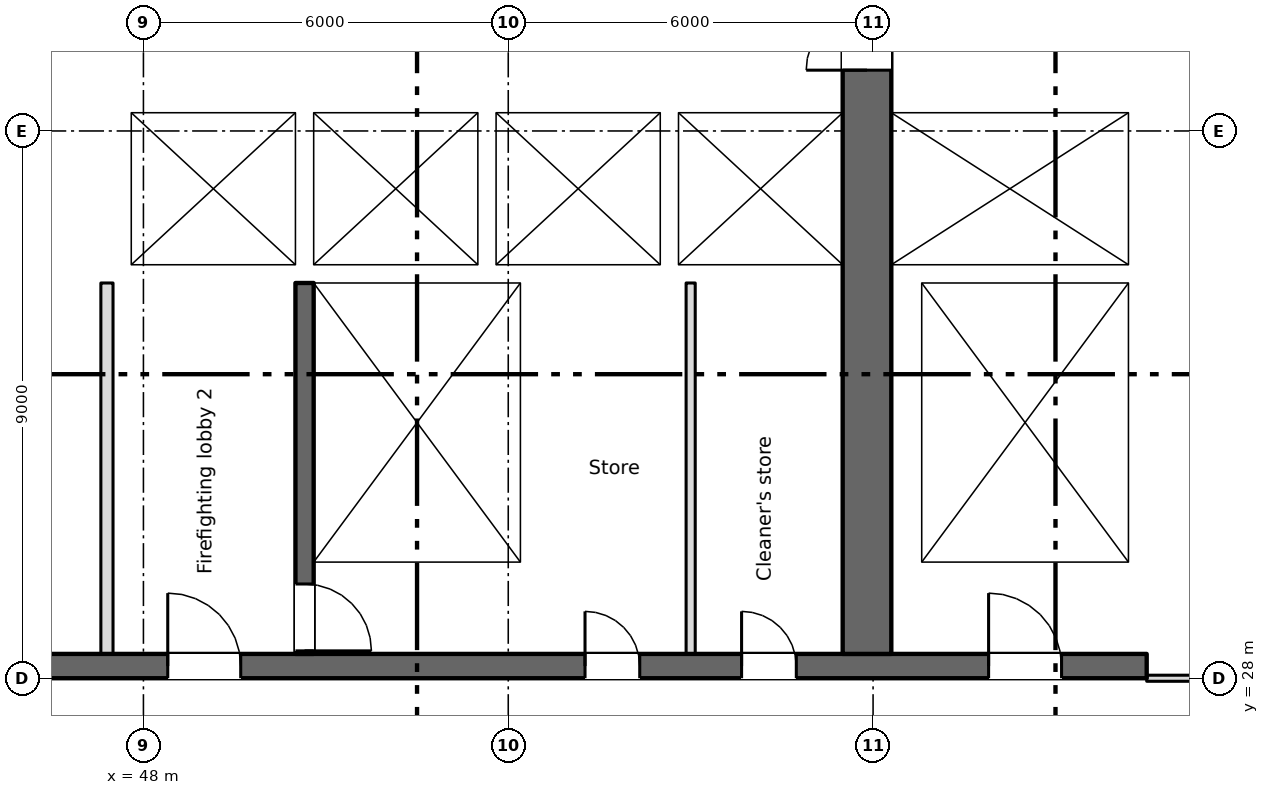
"""IFC4 building model, lengths in metres.
Left out: names, types, materials, properties, quantities, classifications, styles, units other than length and angle.
Written with IfcOpenShell. Run it as: python <this file> out.ifc"""

import sys

from ifc_helpers import new_model, si_unit, direction, frame, frame_2d, origin, place, context, subcontext, project, spatial, rectangle, extrude, element, fill, save


model = new_model("IFC4")
c1 = context("Model", 3, precision=1e-05, world=origin(), true_north=direction((0.0, 1.0)))
c2 = subcontext(c1, "Body", "Model", "MODEL_VIEW")
j1 = project(units=[si_unit("LENGTHUNIT", "METRE"), si_unit("PLANEANGLEUNIT", "RADIAN")], contexts=[c1])
p1 = place(None, origin())
s1 = spatial("IfcSite", under=j1, at=p1, CompositionType="ELEMENT")
p2 = place(p1, origin())
s2 = spatial("IfcBuilding", under=s1, at=p2, CompositionType="ELEMENT")
p3 = place(p2, frame((0.0, 0.0, 151.25)))
s3 = spatial("IfcBuildingStorey", under=s2, at=p3, CompositionType="ELEMENT", Elevation=151.25)
p4 = place(p3, frame((6.7, 28.2, 0.0), z_axis=(0.0, 0.0, 1.0), x_axis=(1.0, 0.0, 0.0)))
e1 = element("IfcWall", 1, at=p4, inside=s3, PredefinedType="SHEAR", context=c2, shape_type="SweptSolid", body=[
    extrude(rectangle(XDim=57.8, YDim=0.4, at=frame_2d((28.9, 0.0))), origin(), (0.0, 0.0, 1.0), 3.35),
])
p5 = place(p4, frame((13.85, 0.0, 0.0)))
e2 = element("IfcOpeningElement", 2, at=p5, cuts=e1, PredefinedType="OPENING", context=c2, shape_type="SweptSolid", body=[
    extrude(rectangle(XDim=0.9, YDim=2.1, at=frame_2d((0.45, 1.05))), frame((0.0, 0.21, 0.0), z_axis=(0.0, -1.0, 0.0), x_axis=(1.0, 0.0, 0.0)), (0.0, 0.0, 1.0), 0.42),
])
p6 = place(p4, frame((48.562, 0.0, 0.0)))
e3 = element("IfcOpeningElement", 3, at=p6, cuts=e1, PredefinedType="OPENING", context=c2, shape_type="SweptSolid", body=[
    extrude(rectangle(XDim=0.9, YDim=2.1, at=frame_2d((0.45, 1.05))), frame((0.0, 0.21, 0.0), z_axis=(0.0, -1.0, 0.0), x_axis=(1.0, 0.0, 0.0)), (0.0, 0.0, 1.0), 0.42),
])
p7 = place(p4, frame((51.137, 0.0, 0.0)))
e4 = element("IfcOpeningElement", 4, at=p7, cuts=e1, PredefinedType="OPENING", context=c2, shape_type="SweptSolid", body=[
    extrude(rectangle(XDim=0.9, YDim=2.1, at=frame_2d((0.45, 1.05))), frame((0.0, 0.21, 0.0), z_axis=(0.0, -1.0, 0.0), x_axis=(1.0, 0.0, 0.0)), (0.0, 0.0, 1.0), 0.42),
])
p8 = place(p4, frame((1.35, 0.0, 0.0)))
e5 = element("IfcOpeningElement", 5, at=p8, cuts=e1, PredefinedType="OPENING", context=c2, shape_type="SweptSolid", body=[
    extrude(rectangle(XDim=0.9, YDim=2.1, at=frame_2d((0.45, 1.05))), frame((0.0, 0.21, 0.0), z_axis=(0.0, -1.0, 0.0), x_axis=(1.0, 0.0, 0.0)), (0.0, 0.0, 1.0), 0.42),
])
p9 = place(p4, frame((4.7, 0.0, 0.0)))
e6 = element("IfcOpeningElement", 6, at=p9, cuts=e1, PredefinedType="OPENING", context=c2, shape_type="SweptSolid", body=[
    extrude(rectangle(XDim=1.2, YDim=2.1, at=frame_2d((0.6, 1.05))), frame((0.0, 0.21, 0.0), z_axis=(0.0, -1.0, 0.0), x_axis=(1.0, 0.0, 0.0)), (0.0, 0.0, 1.0), 0.42),
])
p10 = place(p4, frame((31.7, 0.0, 0.0)))
e7 = element("IfcOpeningElement", 7, at=p10, cuts=e1, PredefinedType="OPENING", context=c2, shape_type="SweptSolid", body=[
    extrude(rectangle(XDim=1.2, YDim=2.1, at=frame_2d((0.6, 1.05))), frame((0.0, 0.21, 0.0), z_axis=(0.0, -1.0, 0.0), x_axis=(1.0, 0.0, 0.0)), (0.0, 0.0, 1.0), 0.42),
])
p11 = place(p4, frame((55.2, 0.0, 0.0)))
e8 = element("IfcOpeningElement", 8, at=p11, cuts=e1, PredefinedType="OPENING", context=c2, shape_type="SweptSolid", body=[
    extrude(rectangle(XDim=1.2, YDim=2.1, at=frame_2d((0.6, 1.05))), frame((0.0, 0.21, 0.0), z_axis=(0.0, -1.0, 0.0), x_axis=(1.0, 0.0, 0.0)), (0.0, 0.0, 1.0), 0.42),
])
p12 = place(p4, frame((21.7, 0.0, 0.0)))
e9 = element("IfcOpeningElement", 9, at=p12, cuts=e1, PredefinedType="OPENING", context=c2, shape_type="SweptSolid", body=[
    extrude(rectangle(XDim=1.2, YDim=2.1, at=frame_2d((0.6, 1.05))), frame((0.0, 0.21, 0.0), z_axis=(0.0, -1.0, 0.0), x_axis=(1.0, 0.0, 0.0)), (0.0, 0.0, 1.0), 0.42),
])
p13 = place(p4, frame((41.7, 0.0, 0.0)))
e10 = element("IfcOpeningElement", 10, at=p13, cuts=e1, PredefinedType="OPENING", context=c2, shape_type="SweptSolid", body=[
    extrude(rectangle(XDim=1.2, YDim=2.1, at=frame_2d((0.6, 1.05))), frame((0.0, 0.21, 0.0), z_axis=(0.0, -1.0, 0.0), x_axis=(1.0, 0.0, 0.0)), (0.0, 0.0, 1.0), 0.42),
])
p14 = place(p4, frame((24.85, 0.0, 0.0)))
e11 = element("IfcOpeningElement", 11, at=p14, cuts=e1, PredefinedType="OPENING", context=c2, shape_type="SweptSolid", body=[
    extrude(rectangle(XDim=2.4, YDim=2.1, at=frame_2d((1.2, 1.05))), frame((0.0, 0.21, 0.0), z_axis=(0.0, -1.0, 0.0), x_axis=(1.0, 0.0, 0.0)), (0.0, 0.0, 1.0), 0.42),
])
p15 = place(p4, frame((37.35, 0.0, 0.0)))
e12 = element("IfcOpeningElement", 12, at=p15, cuts=e1, PredefinedType="OPENING", context=c2, shape_type="SweptSolid", body=[
    extrude(rectangle(XDim=2.4, YDim=2.1, at=frame_2d((1.2, 1.05))), frame((0.0, 0.21, 0.0), z_axis=(0.0, -1.0, 0.0), x_axis=(1.0, 0.0, 0.0)), (0.0, 0.0, 1.0), 0.42),
])
p16 = place(p4, frame((7.95, 0.0, 0.0)))
e13 = element("IfcOpeningElement", 13, at=p16, cuts=e1, PredefinedType="OPENING", context=c2, shape_type="SweptSolid", body=[
    extrude(rectangle(XDim=2.4, YDim=2.1, at=frame_2d((1.2, 1.05))), frame((0.0, 0.21, 0.0), z_axis=(0.0, -1.0, 0.0), x_axis=(1.0, 0.0, 0.0)), (0.0, 0.0, 1.0), 0.42),
])
p17 = place(p4, frame((28.85, 0.0, 0.0)))
e14 = element("IfcOpeningElement", 14, at=p17, cuts=e1, PredefinedType="OPENING", context=c2, shape_type="SweptSolid", body=[
    extrude(rectangle(XDim=0.9, YDim=2.1, at=frame_2d((0.45, 1.05))), frame((0.0, 0.21, 0.0), z_axis=(0.0, -1.0, 0.0), x_axis=(1.0, 0.0, 0.0)), (0.0, 0.0, 1.0), 0.42),
])
p18 = place(p4, frame((34.85, 0.0, 0.0)))
e15 = element("IfcOpeningElement", 15, at=p18, cuts=e1, PredefinedType="OPENING", context=c2, shape_type="SweptSolid", body=[
    extrude(rectangle(XDim=0.9, YDim=2.1, at=frame_2d((0.45, 1.05))), frame((0.0, 0.21, 0.0), z_axis=(0.0, -1.0, 0.0), x_axis=(1.0, 0.0, 0.0)), (0.0, 0.0, 1.0), 0.42),
])
p19 = place(p3, frame((64.35, 34.8, 0.0), z_axis=(0.0, 0.0, 1.0), x_axis=(0.0, 1.0, 0.0)))
e16 = element("IfcWall", 16, at=p19, inside=s3, PredefinedType="SHEAR", context=c2, shape_type="SweptSolid", body=[
    extrude(rectangle(XDim=10.4, YDim=0.3, at=frame_2d((5.2, 0.0))), origin(), (0.0, 0.0, 1.0), 3.35),
])
p20 = place(p3, frame((59.9, 28.4, 0.0), z_axis=(0.0, 0.0, 1.0), x_axis=(0.0, 1.0, 0.0)))
e17 = element("IfcWall", 17, at=p20, inside=s3, PredefinedType="SHEAR", context=c2, shape_type="SweptSolid", body=[
    extrude(rectangle(XDim=16.8, YDim=0.8, at=frame_2d((8.4, 0.0))), origin(), (0.0, 0.0, 1.0), 3.35),
])
p21 = place(p20, frame((9.6, 0.0, 0.0)))
e18 = element("IfcOpeningElement", 18, at=p21, cuts=e17, PredefinedType="OPENING", context=c2, shape_type="SweptSolid", body=[
    extrude(rectangle(XDim=2.0, YDim=2.1, at=frame_2d((1.0, 1.05))), frame((0.0, 0.41, 0.0), z_axis=(0.0, -1.0, 0.0), x_axis=(1.0, 0.0, 0.0)), (0.0, 0.0, 1.0), 0.82),
])
p22 = place(p20, frame((15.35, 0.0, 0.0)))
e19 = element("IfcOpeningElement", 19, at=p22, cuts=e17, PredefinedType="OPENING", context=c2, shape_type="SweptSolid", body=[
    extrude(rectangle(XDim=1.2, YDim=2.1, at=frame_2d((0.6, 1.05))), frame((0.0, 0.41, 0.0), z_axis=(0.0, -1.0, 0.0), x_axis=(1.0, 0.0, 0.0)), (0.0, 0.0, 1.0), 0.82),
])
p23 = place(p3, frame((50.65, 34.5, 0.0), z_axis=(0.0, 0.0, 1.0), x_axis=(0.0, -1.0, 0.0)))
e20 = element("IfcWall", 20, at=p23, inside=s3, PredefinedType="SHEAR", context=c2, shape_type="SweptSolid", body=[
    extrude(rectangle(XDim=6.1, YDim=0.3, at=frame_2d((3.05, 0.0))), origin(), (0.0, 0.0, 1.0), 3.35),
])
p24 = place(p23, frame((4.95, 0.0, 0.0)))
e21 = element("IfcOpeningElement", 21, at=p24, cuts=e20, PredefinedType="OPENING", context=c2, shape_type="SweptSolid", body=[
    extrude(rectangle(XDim=1.1, YDim=2.1, at=frame_2d((0.55, 1.05))), frame((0.0, 0.16, 0.0), z_axis=(0.0, -1.0, 0.0), x_axis=(1.0, 0.0, 0.0)), (0.0, 0.0, 1.0), 0.32),
])
p25 = place(p3, frame((54.35, 28.4, 0.0), z_axis=(0.0, 0.0, 1.0), x_axis=(0.0, 1.0, 0.0)))
e22 = element("IfcWall", 22, at=p25, inside=s3, PredefinedType="SHEAR", context=c2, shape_type="SweptSolid", body=[
    extrude(rectangle(XDim=6.1, YDim=0.3, at=frame_2d((3.05, 0.0))), origin(), (0.0, 0.0, 1.0), 3.35),
])
p26 = place(p3, frame((60.55, 28.4, 0.0), z_axis=(0.0, 0.0, 1.0), x_axis=(0.0, 1.0, 0.0)))
e23 = element("IfcWall", 23, at=p26, inside=s3, PredefinedType="SHEAR", context=c2, shape_type="SweptSolid", body=[
    extrude(rectangle(XDim=6.1, YDim=0.5, at=frame_2d((3.05, 0.0))), origin(), (0.0, 0.0, 1.0), 3.35),
])
p27 = place(p3, frame((64.35, 28.4, 0.0), z_axis=(0.0, 0.0, 1.0), x_axis=(0.0, 1.0, 0.0)))
e24 = element("IfcWall", 24, at=p27, inside=s3, PredefinedType="SHEAR", context=c2, shape_type="SweptSolid", body=[
    extrude(rectangle(XDim=6.1, YDim=0.3, at=frame_2d((3.05, 0.0))), origin(), (0.0, 0.0, 1.0), 3.35),
])
p28 = place(p3, frame((47.3, 34.65, 0.0), z_axis=(0.0, 0.0, 1.0), x_axis=(1.0, 0.0, 0.0)))
e25 = element("IfcWall", 25, at=p28, inside=s3, PredefinedType="SHEAR", context=c2, shape_type="SweptSolid", body=[
    extrude(rectangle(XDim=12.2, YDim=0.3, at=frame_2d((6.1, 0.0))), origin(), (0.0, 0.0, 1.0), 3.35),
])
p29 = place(p28, frame((1.3, 0.0, 0.0)))
e26 = element("IfcOpeningElement", 26, at=p29, cuts=e25, PredefinedType="OPENING", context=c2, shape_type="SweptSolid", body=[
    extrude(rectangle(XDim=1.1, YDim=2.1, at=frame_2d((0.55, 1.05))), frame((0.0, 0.16, 0.0), z_axis=(0.0, -1.0, 0.0), x_axis=(1.0, 0.0, 0.0)), (0.0, 0.0, 1.0), 0.32),
])
p30 = place(p3, frame((60.3, 34.65, 0.0), z_axis=(0.0, 0.0, 1.0), x_axis=(1.0, 0.0, 0.0)))
e27 = element("IfcWall", 27, at=p30, inside=s3, PredefinedType="SHEAR", context=c2, shape_type="SweptSolid", body=[
    extrude(rectangle(XDim=4.2, YDim=0.3, at=frame_2d((2.1, 0.0))), origin(), (0.0, 0.0, 1.0), 3.35),
])
p31 = place(p3, frame((47.3, 37.45, 0.0), z_axis=(0.0, 0.0, 1.0), x_axis=(1.0, 0.0, 0.0)))
e28 = element("IfcWall", 28, at=p31, inside=s3, PredefinedType="SHEAR", context=c2, shape_type="SweptSolid", body=[
    extrude(rectangle(XDim=12.2, YDim=0.3, at=frame_2d((6.1, 0.0))), origin(), (0.0, 0.0, 1.0), 3.35),
])
p32 = place(p31, frame((4.3, 0.0, 0.0)))
e29 = element("IfcOpeningElement", 29, at=p32, cuts=e28, PredefinedType="OPENING", context=c2, shape_type="SweptSolid", body=[
    extrude(rectangle(XDim=1.1, YDim=2.1, at=frame_2d((0.55, 1.05))), frame((0.0, 0.16, 0.0), z_axis=(0.0, -1.0, 0.0), x_axis=(1.0, 0.0, 0.0)), (0.0, 0.0, 1.0), 0.32),
])
p33 = place(p31, frame((7.3, 0.0, 0.0)))
e30 = element("IfcOpeningElement", 30, at=p33, cuts=e28, PredefinedType="OPENING", context=c2, shape_type="SweptSolid", body=[
    extrude(rectangle(XDim=1.1, YDim=2.1, at=frame_2d((0.55, 1.05))), frame((0.0, 0.16, 0.0), z_axis=(0.0, -1.0, 0.0), x_axis=(1.0, 0.0, 0.0)), (0.0, 0.0, 1.0), 0.32),
])
p34 = place(p31, frame((10.3, 0.0, 0.0)))
e31 = element("IfcOpeningElement", 31, at=p34, cuts=e28, PredefinedType="OPENING", context=c2, shape_type="SweptSolid", body=[
    extrude(rectangle(XDim=1.1, YDim=2.1, at=frame_2d((0.55, 1.05))), frame((0.0, 0.16, 0.0), z_axis=(0.0, -1.0, 0.0), x_axis=(1.0, 0.0, 0.0)), (0.0, 0.0, 1.0), 0.32),
])
p35 = place(p3, frame((60.3, 37.45, 0.0), z_axis=(0.0, 0.0, 1.0), x_axis=(1.0, 0.0, 0.0)))
e32 = element("IfcWall", 32, at=p35, inside=s3, PredefinedType="SHEAR", context=c2, shape_type="SweptSolid", body=[
    extrude(rectangle(XDim=3.9, YDim=0.3, at=frame_2d((1.95, 0.0))), origin(), (0.0, 0.0, 1.0), 3.35),
])
p36 = place(p35, frame((1.4, 0.0, 0.0)))
e33 = element("IfcOpeningElement", 33, at=p36, cuts=e32, PredefinedType="OPENING", context=c2, shape_type="SweptSolid", body=[
    extrude(rectangle(XDim=1.1, YDim=2.1, at=frame_2d((0.55, 1.05))), frame((0.0, 0.16, 0.0), z_axis=(0.0, -1.0, 0.0), x_axis=(1.0, 0.0, 0.0)), (0.0, 0.0, 1.0), 0.32),
])
p37 = place(p3, frame((47.55, 34.8, 0.0), z_axis=(0.0, 0.0, 1.0), x_axis=(0.0, 1.0, 0.0)))
e34 = element("IfcWall", 34, at=p37, inside=s3, PredefinedType="SHEAR", context=c2, shape_type="SweptSolid", body=[
    extrude(rectangle(XDim=2.5, YDim=0.5, at=frame_2d((1.25, 0.0))), origin(), (0.0, 0.0, 1.0), 3.35),
])
for number, where, z_axis, x_axis in (
    (35, (50.65, 34.8, 0.0), (0.0, 0.0, 1.0), (0.0, 1.0, 0.0)),
    (36, (53.65, 34.8, 0.0), (0.0, 0.0, 1.0), (0.0, 1.0, 0.0)),
    (37, (56.65, 34.8, 0.0), (0.0, 0.0, 1.0), (0.0, 1.0, 0.0)),
):
    element("IfcWall", number, at=place(p3, frame(where, z_axis=z_axis, x_axis=x_axis)), inside=s3, PredefinedType="SHEAR", context=c2, shape_type="SweptSolid", body=[
        extrude(rectangle(XDim=2.5, YDim=0.3, at=frame_2d((1.25, 0.0))), origin(), (0.0, 0.0, 1.0), 3.35),
    ])
p38 = place(p3, frame((47.4, 28.4, 0.0), z_axis=(0.0, 0.0, 1.0), x_axis=(0.0, 1.0, 0.0)))
e38 = element("IfcWall", 38, at=p38, inside=s3, PredefinedType="PARTITIONING", context=c2, shape_type="SweptSolid", body=[
    extrude(rectangle(XDim=6.1, YDim=0.2, at=frame_2d((3.05, 0.0))), origin(), (0.0, 0.0, 1.0), 3.35),
])
p39 = place(p3, frame((57.0, 28.4, 0.0), z_axis=(0.0, 0.0, 1.0), x_axis=(0.0, 1.0, 0.0)))
e39 = element("IfcWall", 39, at=p39, inside=s3, PredefinedType="PARTITIONING", context=c2, shape_type="SweptSolid", body=[
    extrude(rectangle(XDim=6.1, YDim=0.15, at=frame_2d((3.05, 0.0))), origin(), (0.0, 0.0, 1.0), 3.35),
])
p40 = place(p3, frame((64.5, 28.0, 0.0), z_axis=(0.0, 0.0, 1.0), x_axis=(1.0, 0.0, 0.0)))
e40 = element("IfcWall", 40, at=p40, inside=s3, PredefinedType="PARTITIONING", context=c2, shape_type="SweptSolid", body=[
    extrude(rectangle(XDim=6.8, YDim=0.1, at=frame_2d((3.4, 0.0))), origin(), (0.0, 0.0, 1.0), 3.35),
])
p41 = place(p40, frame((2.5, 0.0, 0.0)))
e41 = element("IfcOpeningElement", 41, at=p41, cuts=e40, PredefinedType="OPENING", context=c2, shape_type="SweptSolid", body=[
    extrude(rectangle(XDim=1.8, YDim=2.1, at=frame_2d((0.9, 1.05))), frame((0.0, 0.06, 0.0), z_axis=(0.0, -1.0, 0.0), x_axis=(1.0, 0.0, 0.0)), (0.0, 0.0, 1.0), 0.12),
])
p42 = place(p6, origin())
e42 = element("IfcDoor", 42, at=p42, inside=s3, OperationType="SINGLE_SWING_LEFT", PredefinedType="DOOR", context=c2, shape_type="SweptSolid", body=[
    extrude(rectangle(XDim=0.9, YDim=2.1, at=frame_2d((0.45, 1.05))), frame((0.0, 0.025, 0.0), z_axis=(0.0, -1.0, 0.0), x_axis=(1.0, 0.0, 0.0)), (0.0, 0.0, 1.0), 0.05),
])
fill(e3, e42)
p43 = place(p7, origin())
e43 = element("IfcDoor", 43, at=p43, inside=s3, OperationType="SINGLE_SWING_LEFT", PredefinedType="DOOR", context=c2, shape_type="SweptSolid", body=[
    extrude(rectangle(XDim=0.9, YDim=2.1, at=frame_2d((0.45, 1.05))), frame((0.0, 0.025, 0.0), z_axis=(0.0, -1.0, 0.0), x_axis=(1.0, 0.0, 0.0)), (0.0, 0.0, 1.0), 0.05),
])
fill(e4, e43)
p44 = place(p32, origin())
e44 = element("IfcDoor", 44, at=p44, inside=s3, OperationType="SLIDING_TO_LEFT", PredefinedType="DOOR", context=c2, shape_type="SweptSolid", body=[
    extrude(rectangle(XDim=1.1, YDim=2.1, at=frame_2d((0.55, 1.05))), frame((0.0, 0.025, 0.0), z_axis=(0.0, -1.0, 0.0), x_axis=(1.0, 0.0, 0.0)), (0.0, 0.0, 1.0), 0.05),
])
fill(e29, e44)
p45 = place(p33, origin())
e45 = element("IfcDoor", 45, at=p45, inside=s3, OperationType="SLIDING_TO_LEFT", PredefinedType="DOOR", context=c2, shape_type="SweptSolid", body=[
    extrude(rectangle(XDim=1.1, YDim=2.1, at=frame_2d((0.55, 1.05))), frame((0.0, 0.025, 0.0), z_axis=(0.0, -1.0, 0.0), x_axis=(1.0, 0.0, 0.0)), (0.0, 0.0, 1.0), 0.05),
])
fill(e30, e45)
p46 = place(p34, origin())
e46 = element("IfcDoor", 46, at=p46, inside=s3, OperationType="SLIDING_TO_LEFT", PredefinedType="DOOR", context=c2, shape_type="SweptSolid", body=[
    extrude(rectangle(XDim=1.1, YDim=2.1, at=frame_2d((0.55, 1.05))), frame((0.0, 0.025, 0.0), z_axis=(0.0, -1.0, 0.0), x_axis=(1.0, 0.0, 0.0)), (0.0, 0.0, 1.0), 0.05),
])
fill(e31, e46)
p47 = place(p36, origin())
e47 = element("IfcDoor", 47, at=p47, inside=s3, OperationType="SLIDING_TO_LEFT", PredefinedType="DOOR", context=c2, shape_type="SweptSolid", body=[
    extrude(rectangle(XDim=1.1, YDim=2.1, at=frame_2d((0.55, 1.05))), frame((0.0, 0.025, 0.0), z_axis=(0.0, -1.0, 0.0), x_axis=(1.0, 0.0, 0.0)), (0.0, 0.0, 1.0), 0.05),
])
fill(e33, e47)
p48 = place(p29, origin())
e48 = element("IfcDoor", 48, at=p48, inside=s3, OperationType="SLIDING_TO_LEFT", PredefinedType="DOOR", context=c2, shape_type="SweptSolid", body=[
    extrude(rectangle(XDim=1.1, YDim=2.1, at=frame_2d((0.55, 1.05))), frame((0.0, 0.025, 0.0), z_axis=(0.0, -1.0, 0.0), x_axis=(1.0, 0.0, 0.0)), (0.0, 0.0, 1.0), 0.05),
])
fill(e26, e48)
p49 = place(p24, origin())
e49 = element("IfcDoor", 49, at=p49, inside=s3, OperationType="SINGLE_SWING_RIGHT", PredefinedType="DOOR", context=c2, shape_type="SweptSolid", body=[
    extrude(rectangle(XDim=1.1, YDim=2.1, at=frame_2d((0.55, 1.05))), frame((0.0, 0.025, 0.0), z_axis=(0.0, -1.0, 0.0), x_axis=(1.0, 0.0, 0.0)), (0.0, 0.0, 1.0), 0.05),
])
fill(e21, e49)
p50 = place(p11, origin())
e50 = element("IfcDoor", 50, at=p50, inside=s3, OperationType="SINGLE_SWING_LEFT", PredefinedType="DOOR", context=c2, shape_type="SweptSolid", body=[
    extrude(rectangle(XDim=1.2, YDim=2.1, at=frame_2d((0.6, 1.05))), frame((0.0, 0.025, 0.0), z_axis=(0.0, -1.0, 0.0), x_axis=(1.0, 0.0, 0.0)), (0.0, 0.0, 1.0), 0.05),
])
fill(e8, e50)
p51 = place(p13, origin())
e51 = element("IfcDoor", 51, at=p51, inside=s3, OperationType="SINGLE_SWING_LEFT", PredefinedType="DOOR", context=c2, shape_type="SweptSolid", body=[
    extrude(rectangle(XDim=1.2, YDim=2.1, at=frame_2d((0.6, 1.05))), frame((0.0, 0.025, 0.0), z_axis=(0.0, -1.0, 0.0), x_axis=(1.0, 0.0, 0.0)), (0.0, 0.0, 1.0), 0.05),
])
fill(e10, e51)
p52 = place(p21, origin())
e52 = element("IfcDoor", 52, at=p52, inside=s3, OperationType="DOUBLE_DOOR_SINGLE_SWING", PredefinedType="DOOR", context=c2, shape_type="SweptSolid", body=[
    extrude(rectangle(XDim=2.0, YDim=2.1, at=frame_2d((1.0, 1.05))), frame((0.0, 0.025, 0.0), z_axis=(0.0, -1.0, 0.0), x_axis=(1.0, 0.0, 0.0)), (0.0, 0.0, 1.0), 0.05),
])
fill(e18, e52)
save(model, sys.argv[1])
